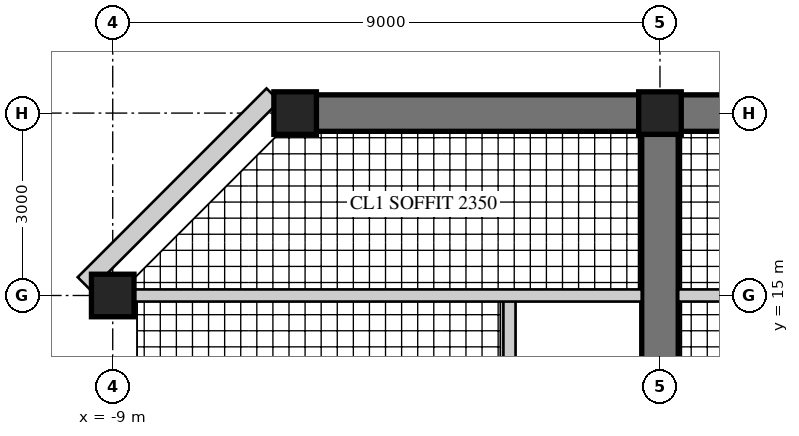
"""IFC4 building model, lengths in metres.
Left out: names, types, materials, properties, quantities, classifications, styles, units other than length and angle.
Written with IfcOpenShell. Run it as: python <this file> out.ifc"""

import sys

from ifc_helpers import new_model, si_unit, direction, frame, frame_2d, origin, origin_2d, place, context, subcontext, project, spatial, rectangle, hollow_rectangle, extrude, element, fill, save


model = new_model("IFC4")
c1 = context("Model", 3, precision=1e-05, world=origin(), true_north=direction((0.0, 1.0)))
c2 = subcontext(c1, "Body", "Model", "MODEL_VIEW")
j1 = project(units=[si_unit("LENGTHUNIT", "METRE"), si_unit("PLANEANGLEUNIT", "RADIAN")], contexts=[c1])
p1 = place(None, origin())
s1 = spatial("IfcSite", under=j1, at=p1, CompositionType="ELEMENT")
p2 = place(p1, origin())
s2 = spatial("IfcBuilding", under=s1, at=p2, CompositionType="ELEMENT")
p3 = place(p2, frame((0.0, 0.0, 267.9)))
s3 = spatial("IfcBuildingStorey", under=s2, at=p3, CompositionType="ELEMENT", Elevation=267.9)
p4 = place(p3, frame((0.0, 9.0, 0.0), z_axis=(0.0, 0.0, 1.0), x_axis=(0.0, 1.0, 0.0)))
e1 = element("IfcWall", 1, at=p4, inside=s3, PredefinedType="SHEAR", context=c2, shape_type="SweptSolid", body=[
    extrude(rectangle(XDim=9.0, YDim=0.6, at=frame_2d((4.5, 0.0))), origin(), (0.0, 0.0, 1.0), 3.4),
])
p5 = place(p4, frame((3.8, 0.0, 0.0)))
e2 = element("IfcOpeningElement", 2, at=p5, cuts=e1, PredefinedType="OPENING", context=c2, shape_type="SweptSolid", body=[
    extrude(rectangle(XDim=1.0, YDim=2.15, at=frame_2d((0.5, 1.075))), frame((0.0, 0.31, 0.0), z_axis=(0.0, -1.0, 0.0), x_axis=(1.0, 0.0, 0.0)), (0.0, 0.0, 1.0), 0.62),
])
p6 = place(p4, frame((7.0, 0.0, 0.0)))
e3 = element("IfcOpeningElement", 3, at=p6, cuts=e1, PredefinedType="OPENING", context=c2, shape_type="SweptSolid", body=[
    extrude(rectangle(XDim=1.0, YDim=2.2, at=frame_2d((0.5, 1.1))), frame((0.0, 0.31, 0.0), z_axis=(0.0, -1.0, 0.0), x_axis=(1.0, 0.0, 0.0)), (0.0, 0.0, 1.0), 0.62),
])
p7 = place(p3, frame((6.0, 18.0, 0.0), z_axis=(0.0, 0.0, 1.0), x_axis=(-1.0, 0.0, 0.0)))
e4 = element("IfcWall", 4, at=p7, inside=s3, PredefinedType="SHEAR", context=c2, shape_type="SweptSolid", body=[
    extrude(rectangle(XDim=12.0, YDim=0.6, at=frame_2d((6.0, 0.0))), origin(), (0.0, 0.0, 1.0), 3.4),
])
p8 = place(p7, frame((1.625, 0.0, 0.6)))
e5 = element("IfcOpeningElement", 5, at=p8, cuts=e4, PredefinedType="OPENING", context=c2, shape_type="SweptSolid", body=[
    extrude(rectangle(XDim=3.0, YDim=2.4, at=frame_2d((1.5, 1.2))), frame((0.0, 0.31, 0.0), z_axis=(0.0, -1.0, 0.0), x_axis=(1.0, 0.0, 0.0)), (0.0, 0.0, 1.0), 0.62),
])
p9 = place(p7, frame((7.375, 0.0, 0.6)))
e6 = element("IfcOpeningElement", 6, at=p9, cuts=e4, PredefinedType="OPENING", context=c2, shape_type="SweptSolid", body=[
    extrude(rectangle(XDim=3.0, YDim=2.4, at=frame_2d((1.5, 1.2))), frame((0.0, 0.31, 0.0), z_axis=(0.0, -1.0, 0.0), x_axis=(1.0, 0.0, 0.0)), (0.0, 0.0, 1.0), 0.62),
])
for number, where, z_axis, x_axis in (
    (7, (-9.0, 15.0, 0.0), (0.0, 0.0, 1.0), (1.0, 0.0, 0.0)),
    (8, (0.0, 18.0, 0.0), (0.0, 0.0, 1.0), (1.0, 0.0, 0.0)),
    (9, (-6.0, 18.0, 0.0), (0.0, 0.0, 1.0), (1.0, 0.0, 0.0)),
):
    element("IfcColumn", number, at=place(p3, frame(where, z_axis=z_axis, x_axis=x_axis)), inside=s3, PredefinedType="COLUMN", context=c2, shape_type="SweptSolid", body=[
        extrude(rectangle(XDim=0.7, YDim=0.7, at=origin_2d()), origin(), (0.0, 0.0, 1.0), 3.4),
    ])
p10 = place(p3, frame((-6.365, 18.3, 0.0), z_axis=(0.0, 0.0, 1.0), x_axis=(-0.70707898447, -0.707134576811, 0.0)))
e10 = element("IfcWall", 10, at=p10, inside=s3, PredefinedType="SOLIDWALL", context=c2, shape_type="SweptSolid", body=[
    extrude(rectangle(XDim=4.392, YDim=0.3, at=frame_2d((2.196, 0.0))), origin(), (0.0, 0.0, 1.0), 3.22),
])
p11 = place(p10, frame((1.746, 0.0, 0.3)))
e11 = element("IfcOpeningElement", 11, at=p11, cuts=e10, PredefinedType="OPENING", context=c2, shape_type="SweptSolid", body=[
    extrude(rectangle(XDim=0.9, YDim=2.4, at=frame_2d((0.45, 1.2))), frame((0.0, 0.16, 0.0), z_axis=(0.0, -1.0, 0.0), x_axis=(1.0, 0.0, 0.0)), (0.0, 0.0, 1.0), 0.32),
])
p12 = place(p3, frame((-2.475, 9.4, 0.0), z_axis=(0.0, 0.0, 1.0), x_axis=(0.0, 1.0, 0.0)))
e12 = element("IfcWall", 12, at=p12, inside=s3, PredefinedType="SOLIDWALL", context=c2, shape_type="SweptSolid", body=[
    extrude(rectangle(XDim=5.6, YDim=0.2, at=frame_2d((2.8, 0.0))), origin(), (0.0, 0.0, 1.0), 3.22),
])
p13 = place(p12, frame((3.4, 0.0, 0.0)))
e13 = element("IfcOpeningElement", 13, at=p13, cuts=e12, PredefinedType="OPENING", context=c2, shape_type="SweptSolid", body=[
    extrude(rectangle(XDim=1.0, YDim=2.15, at=frame_2d((0.5, 1.075))), frame((0.0, 0.11, 0.0), z_axis=(0.0, -1.0, 0.0), x_axis=(1.0, 0.0, 0.0)), (0.0, 0.0, 1.0), 0.22),
])
p14 = place(p3, frame((8.65, 15.0, 0.0), z_axis=(0.0, 0.0, 1.0), x_axis=(-1.0, 0.0, 0.0)))
e14 = element("IfcWall", 14, at=p14, inside=s3, PredefinedType="SOLIDWALL", context=c2, shape_type="SweptSolid", body=[
    extrude(rectangle(XDim=8.35, YDim=0.2, at=frame_2d((4.175, 0.0))), origin(), (0.0, 0.0, 1.0), 2.52),
])
p15 = place(p3, frame((-0.3, 15.0, 0.0), z_axis=(0.0, 0.0, 1.0), x_axis=(-1.0, 0.0, 0.0)))
e15 = element("IfcWall", 15, at=p15, inside=s3, PredefinedType="SOLIDWALL", context=c2, shape_type="SweptSolid", body=[
    extrude(rectangle(XDim=8.35, YDim=0.2, at=frame_2d((4.175, 0.0))), origin(), (0.0, 0.0, 1.0), 2.52),
])
p16 = place(p15, frame((0.4, 0.0, 0.0)))
e16 = element("IfcOpeningElement", 16, at=p16, cuts=e15, PredefinedType="OPENING", context=c2, shape_type="SweptSolid", body=[
    extrude(rectangle(XDim=1.0, YDim=2.2, at=frame_2d((0.5, 1.1))), frame((0.0, 0.11, 0.0), z_axis=(0.0, -1.0, 0.0), x_axis=(1.0, 0.0, 0.0)), (0.0, 0.0, 1.0), 0.22),
])
p17 = place(p9, origin())
e17 = element("IfcWindow", 17, at=p17, inside=s3, PartitioningType="SINGLE_PANEL", PredefinedType="WINDOW", context=c2, shape_type="SweptSolid", body=[
    extrude(hollow_rectangle(XDim=3.0, YDim=2.4, WallThickness=0.06, at=frame_2d((1.5, 1.2))), frame((0.0, 0.03, 0.0), z_axis=(0.0, -1.0, 0.0), x_axis=(1.0, 0.0, 0.0)), (0.0, 0.0, 1.0), 0.06),
    extrude(rectangle(XDim=2.879, YDim=2.279, at=frame_2d((1.5, 1.2))), frame((0.0, 0.03, 0.0), z_axis=(0.0, -1.0, 0.0), x_axis=(1.0, 0.0, 0.0)), (0.0, 0.0, 1.0), 0.06),
])
fill(e6, e17)
p18 = place(p11, origin())
e18 = element("IfcWindow", 18, at=p18, inside=s3, PartitioningType="SINGLE_PANEL", PredefinedType="WINDOW", context=c2, shape_type="SweptSolid", body=[
    extrude(hollow_rectangle(XDim=0.9, YDim=2.4, WallThickness=0.06, at=frame_2d((0.45, 1.2))), frame((0.0, 0.03, 0.0), z_axis=(0.0, -1.0, 0.0), x_axis=(1.0, 0.0, 0.0)), (0.0, 0.0, 1.0), 0.06),
    extrude(rectangle(XDim=0.779, YDim=2.279, at=frame_2d((0.45, 1.2))), frame((0.0, 0.03, 0.0), z_axis=(0.0, -1.0, 0.0), x_axis=(1.0, 0.0, 0.0)), (0.0, 0.0, 1.0), 0.06),
])
fill(e11, e18)
p19 = place(p16, frame((1.0, 0.0, 0.0), z_axis=(0.0, 0.0, 1.0), x_axis=(-1.0, 0.0, 0.0)))
e19 = element("IfcDoor", 19, at=p19, inside=s3, OperationType="SINGLE_SWING_RIGHT", PredefinedType="DOOR", context=c2, shape_type="SweptSolid", body=[
    extrude(rectangle(XDim=1.0, YDim=2.2, at=frame_2d((0.5, 1.1))), frame((0.0, 0.025, 0.0), z_axis=(0.0, -1.0, 0.0), x_axis=(1.0, 0.0, 0.0)), (0.0, 0.0, 1.0), 0.05),
])
fill(e16, e19)
p20 = place(p6, origin())
e20 = element("IfcDoor", 20, at=p20, inside=s3, OperationType="SINGLE_SWING_RIGHT", PredefinedType="DOOR", context=c2, shape_type="SweptSolid", body=[
    extrude(rectangle(XDim=1.0, YDim=2.2, at=frame_2d((0.5, 1.1))), frame((0.0, 0.025, 0.0), z_axis=(0.0, -1.0, 0.0), x_axis=(1.0, 0.0, 0.0)), (0.0, 0.0, 1.0), 0.05),
])
fill(e3, e20)
save(model, sys.argv[1])
